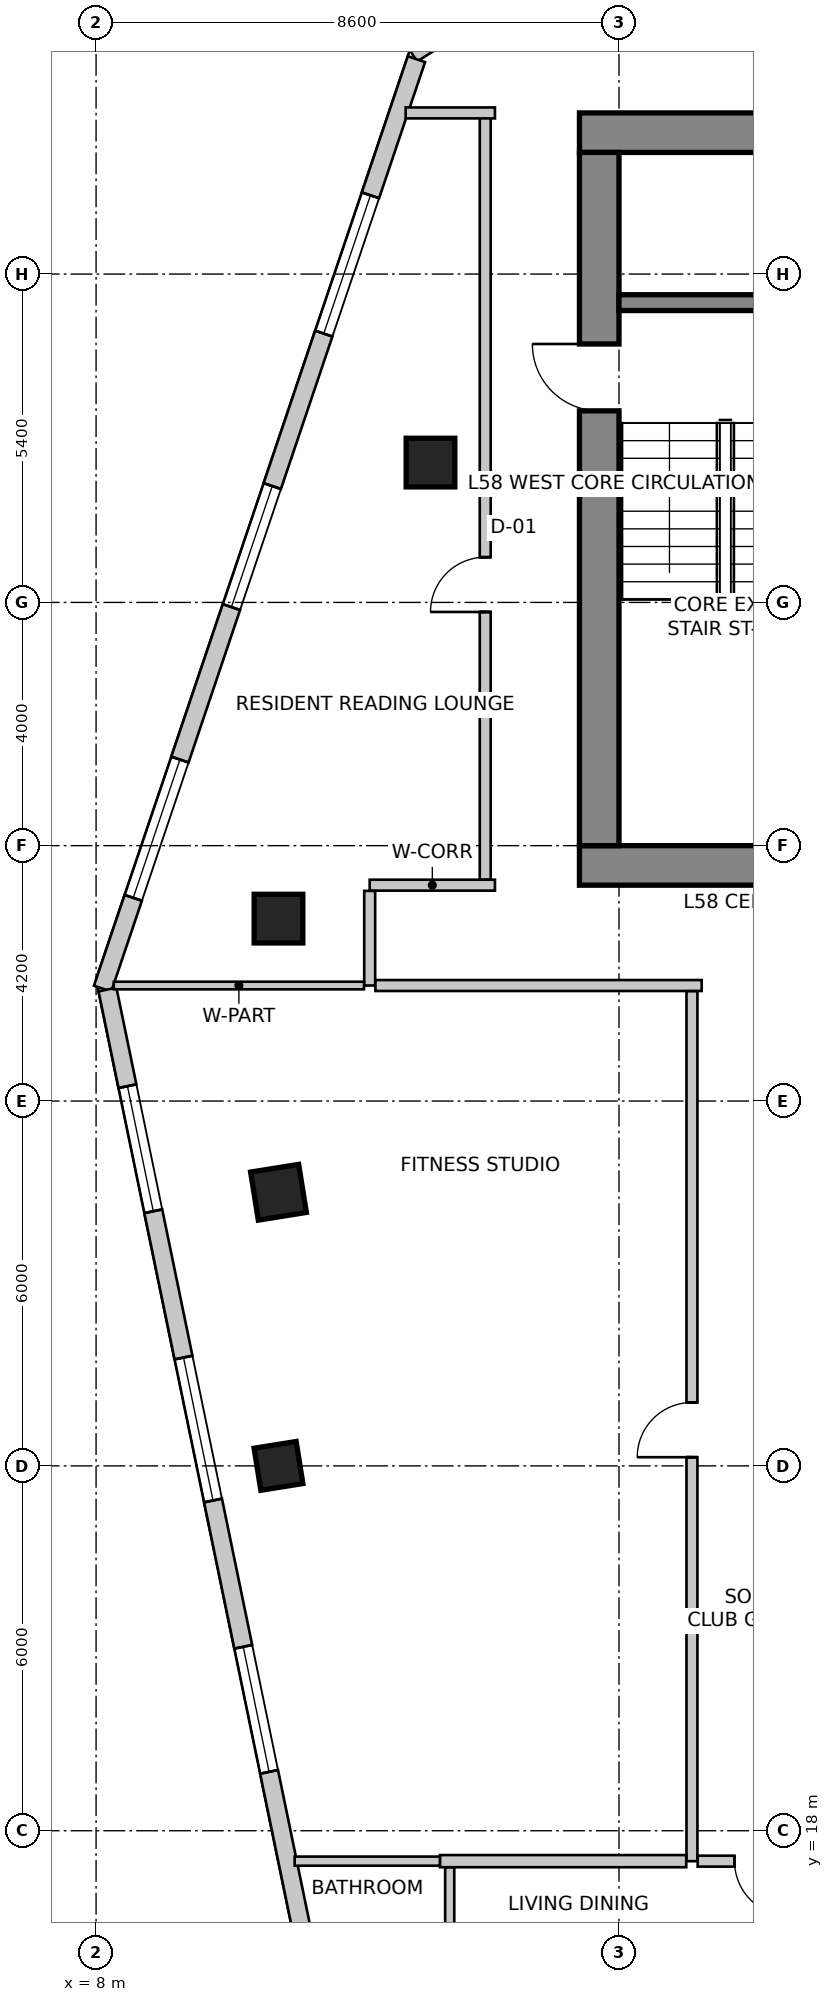
"""IFC4 building model, lengths in metres.
Left out: names, types, materials, properties, quantities, classifications, styles, units other than length and angle.
Written with IfcOpenShell. Run it as: python <this file> out.ifc"""

import sys

from ifc_helpers import new_model, si_unit, direction, frame, frame_2d, origin, origin_2d, place, context, subcontext, project, spatial, rectangle, extrude, source, transform, mapped, element, fill, save


model = new_model("IFC4")
c1 = context("Model", 3, precision=1e-05, world=origin(), true_north=direction((0.0, 1.0)))
c2 = subcontext(c1, "Body", "Model", "MODEL_VIEW")
j1 = project(units=[si_unit("LENGTHUNIT", "METRE"), si_unit("PLANEANGLEUNIT", "RADIAN")], contexts=[c1])
p1 = place(None, origin())
s1 = spatial("IfcSite", under=j1, at=p1, CompositionType="ELEMENT")
p2 = place(p1, origin())
s2 = spatial("IfcBuilding", under=s1, at=p2, CompositionType="ELEMENT")
p3 = place(p2, frame((0.0, 0.0, 228.9)))
s3 = spatial("IfcBuildingStorey", under=s2, at=p3, CompositionType="ELEMENT", Elevation=228.9)
p4 = place(p3, frame((15.95, 45.925, 0.0), z_axis=(0.0, 0.0, 1.0), x_axis=(1.0, 0.0, 0.0)))
e1 = element("IfcWall", 1, at=p4, inside=s3, PredefinedType="SHEAR", context=c2, shape_type="SweptSolid", body=[
    extrude(rectangle(XDim=15.7, YDim=0.65, at=frame_2d((7.85, 0.0))), origin(), (0.0, 0.0, 1.0), 3.5),
])
p5 = place(p3, frame((15.95, 33.875, 0.0), z_axis=(0.0, 0.0, 1.0), x_axis=(1.0, 0.0, 0.0)))
e2 = element("IfcWall", 2, at=p5, inside=s3, PredefinedType="SHEAR", context=c2, shape_type="SweptSolid", body=[
    extrude(rectangle(XDim=15.7, YDim=0.65, at=frame_2d((7.85, 0.0))), origin(), (0.0, 0.0, 1.0), 3.5),
])
m1 = source(origin(), c2, "Body", "SweptSolid", [
    extrude(rectangle(XDim=1.1, YDim=2.15, at=frame_2d((0.55, 1.075))), frame((0.0, 0.335, 0.0), z_axis=(0.0, -1.0, 0.0), x_axis=(1.0, 0.0, 0.0)), (0.0, 0.0, 1.0), 0.67),
])
p6 = place(p5, frame((10.08, 0.0, 0.0)))
e3 = element("IfcOpeningElement", 3, at=p6, cuts=e2, PredefinedType="OPENING", context=c2, shape_type="MappedRepresentation", body=[
    mapped(m1, transform((0.0, 0.0, 0.0), scale=1.0)),
])
p7 = place(p3, frame((16.275, 34.2, 0.0), z_axis=(0.0, 0.0, 1.0), x_axis=(0.0, 1.0, 0.0)))
e4 = element("IfcWall", 4, at=p7, inside=s3, PredefinedType="SHEAR", context=c2, shape_type="SweptSolid", body=[
    extrude(rectangle(XDim=11.4, YDim=0.65, at=frame_2d((5.7, 0.0))), origin(), (0.0, 0.0, 1.0), 3.5),
])
p8 = place(p7, frame((7.15, 0.0, 0.0)))
e5 = element("IfcOpeningElement", 5, at=p8, cuts=e4, PredefinedType="OPENING", context=c2, shape_type="MappedRepresentation", body=[
    mapped(m1, transform((0.0, 0.0, 0.0), scale=1.0)),
])
p9 = place(p3, frame((16.6, 43.13, 0.0), z_axis=(0.0, 0.0, 1.0), x_axis=(1.0, 0.0, 0.0)))
e6 = element("IfcWall", 6, at=p9, inside=s3, PredefinedType="SHEAR", context=c2, shape_type="SweptSolid", body=[
    extrude(rectangle(XDim=3.5, YDim=0.26, at=frame_2d((1.75, 0.0))), origin(), (0.0, 0.0, 1.0), 3.5),
])
m2 = source(origin(), c2, "Body", "SweptSolid", [
    extrude(rectangle(XDim=0.8, YDim=0.8, at=origin_2d()), origin(), (0.0, 0.0, 1.0), 3.5),
])
for number, where, z_axis, x_axis in (
    (7, (11.0, 33.0, 0.0), (0.0, 0.0, 1.0), (1.0, 0.0, 0.0)),
    (8, (13.5, 40.5, 0.0), (0.0, 0.0, 1.0), (1.0, 0.0, 0.0)),
    (9, (11.0, 28.5, 0.0), (0.0, 0.0, 1.0), (0.158, -0.987, 0.0)),
):
    element("IfcColumn", number, at=place(p3, frame(where, z_axis=z_axis, x_axis=x_axis)), inside=s3, PredefinedType="COLUMN", context=c2, shape_type="MappedRepresentation", body=[
        mapped(m2, transform((0.0, 0.0, 0.0), scale=1.0)),
    ])
m3 = source(origin(), c2, "Body", "SweptSolid", [
    extrude(rectangle(XDim=0.7, YDim=0.7, at=origin_2d()), origin(), (0.0, 0.0, 1.0), 3.5),
])
p10 = place(p3, frame((11.0, 24.0, 0.0), z_axis=(0.0, 0.0, 1.0), x_axis=(0.158158067254, -0.987413806751, 0.0)))
e10 = element("IfcColumn", 10, at=p10, inside=s3, PredefinedType="COLUMN", context=c2, shape_type="MappedRepresentation", body=[
    mapped(m3, transform((0.0, 0.0, 0.0), scale=1.0)),
])
p11 = place(p3, frame((21.874, 52.742, 0.0), z_axis=(0.0, 0.0, 1.0), x_axis=(-0.84365659959, -0.536883173482, 0.0)))
e11 = element("IfcWall", 11, at=p11, inside=s3, PredefinedType="SOLIDWALL", context=c2, shape_type="SweptSolid", body=[
    extrude(rectangle(XDim=10.283, YDim=0.3, at=frame_2d((5.142, 0.0))), origin(), (0.0, 0.0, 1.0), 3.25),
])
m4 = source(origin(), c2, "Body", "SweptSolid", [
    extrude(rectangle(XDim=2.1, YDim=2.0, at=frame_2d((1.05, 1.0))), frame((0.0, 0.16, 0.0), z_axis=(0.0, -1.0, 0.0), x_axis=(1.0, 0.0, 0.0)), (0.0, 0.0, 1.0), 0.32),
])
p12 = place(p11, frame((3.457, 0.0, 0.85)))
e12 = element("IfcOpeningElement", 12, at=p12, cuts=e11, PredefinedType="OPENING", context=c2, shape_type="MappedRepresentation", body=[
    mapped(m4, transform((0.0, 0.0, 0.0), scale=1.0)),
])
p13 = place(p3, frame((13.269, 47.134, 0.0), z_axis=(0.0, 0.0, 1.0), x_axis=(-0.319920776449, -0.947444297464, 0.0)))
e13 = element("IfcWall", 13, at=p13, inside=s3, PredefinedType="SOLIDWALL", context=c2, shape_type="SweptSolid", body=[
    extrude(rectangle(XDim=16.133, YDim=0.3, at=frame_2d((8.067, 0.0))), origin(), (0.0, 0.0, 1.0), 3.25),
])
m5 = source(origin(), c2, "Body", "SweptSolid", [
    extrude(rectangle(XDim=2.4, YDim=2.2, at=frame_2d((1.2, 1.1))), frame((0.0, 0.16, 0.0), z_axis=(0.0, -1.0, 0.0), x_axis=(1.0, 0.0, 0.0)), (0.0, 0.0, 1.0), 0.32),
])
p14 = place(p13, frame((2.363, 0.0, 0.85)))
e14 = element("IfcOpeningElement", 14, at=p14, cuts=e13, PredefinedType="OPENING", context=c2, shape_type="MappedRepresentation", body=[
    mapped(m5, transform((0.0, 0.0, 0.0), scale=1.0)),
])
p15 = place(p13, frame((7.41, 0.0, 0.85)))
e15 = element("IfcOpeningElement", 15, at=p15, cuts=e13, PredefinedType="OPENING", context=c2, shape_type="MappedRepresentation", body=[
    mapped(m4, transform((0.0, 0.0, 0.0), scale=1.0)),
])
p16 = place(p13, frame((12.157, 0.0, 0.85)))
e16 = element("IfcOpeningElement", 16, at=p16, cuts=e13, PredefinedType="OPENING", context=c2, shape_type="MappedRepresentation", body=[
    mapped(m5, transform((0.0, 0.0, 0.0), scale=1.0)),
])
p17 = place(p3, frame((8.188, 31.834, 0.0), z_axis=(0.0, 0.0, 1.0), x_axis=(0.202303475707, -0.979322880217, 0.0)))
e17 = element("IfcWall", 17, at=p17, inside=s3, PredefinedType="SOLIDWALL", context=c2, shape_type="SweptSolid", body=[
    extrude(rectangle(XDim=15.766, YDim=0.3, at=frame_2d((7.883, 0.0))), origin(), (0.0, 0.0, 1.0), 3.25),
])
p18 = place(p17, frame((1.623, 0.0, 0.85)))
e18 = element("IfcOpeningElement", 18, at=p18, cuts=e17, PredefinedType="OPENING", context=c2, shape_type="MappedRepresentation", body=[
    mapped(m4, transform((0.0, 0.0, 0.0), scale=1.0)),
])
p19 = place(p17, frame((6.18, 0.0, 0.85)))
e19 = element("IfcOpeningElement", 19, at=p19, cuts=e17, PredefinedType="OPENING", context=c2, shape_type="MappedRepresentation", body=[
    mapped(m5, transform((0.0, 0.0, 0.0), scale=1.0)),
])
p20 = place(p17, frame((11.037, 0.0, 0.85)))
e20 = element("IfcOpeningElement", 20, at=p20, cuts=e17, PredefinedType="OPENING", context=c2, shape_type="MappedRepresentation", body=[
    mapped(m4, transform((0.0, 0.0, 0.0), scale=1.0)),
])
p21 = place(p3, frame((12.5, 33.55, 0.0), z_axis=(0.0, 0.0, 1.0), x_axis=(1.0, 0.0, 0.0)))
e21 = element("IfcWall", 21, at=p21, inside=s3, PredefinedType="PARTITIONING", context=c2, shape_type="SweptSolid", body=[
    extrude(rectangle(XDim=2.06, YDim=0.18, at=frame_2d((1.03, 0.0))), origin(), (0.0, 0.0, 1.0), 3.25),
])
p22 = place(p3, frame((12.5, 31.9, 0.0), z_axis=(0.0, 0.0, 1.0), x_axis=(0.0, 1.0, 0.0)))
e22 = element("IfcWall", 22, at=p22, inside=s3, PredefinedType="PARTITIONING", context=c2, shape_type="SweptSolid", body=[
    extrude(rectangle(XDim=1.556, YDim=0.18, at=frame_2d((0.778, 0.0))), origin(), (0.0, 0.0, 1.0), 2.919),
])
p23 = place(p3, frame((17.96, 31.9, 0.0), z_axis=(0.0, 0.0, 1.0), x_axis=(-1.0, 0.0, 0.0)))
e23 = element("IfcWall", 23, at=p23, inside=s3, PredefinedType="PARTITIONING", context=c2, shape_type="SweptSolid", body=[
    extrude(rectangle(XDim=5.366, YDim=0.18, at=frame_2d((2.683, 0.0))), origin(), (0.0, 0.0, 1.0), 2.919),
])
p24 = place(p3, frame((14.4, 33.644, 0.0), z_axis=(0.0, 0.0, 1.0), x_axis=(0.0, 1.0, 0.0)))
e24 = element("IfcWall", 24, at=p24, inside=s3, PredefinedType="PARTITIONING", context=c2, shape_type="SweptSolid", body=[
    extrude(rectangle(XDim=12.606, YDim=0.18, at=frame_2d((6.303, 0.0))), origin(), (0.0, 0.0, 1.0), 3.25),
])
m6 = source(origin(), c2, "Body", "SweptSolid", [
    extrude(rectangle(XDim=0.9, YDim=2.15, at=frame_2d((0.45, 1.075))), frame((0.0, 0.1, 0.0), z_axis=(0.0, -1.0, 0.0), x_axis=(1.0, 0.0, 0.0)), (0.0, 0.0, 1.0), 0.2),
])
p25 = place(p24, frame((4.399, 0.0, 0.0)))
e25 = element("IfcOpeningElement", 25, at=p25, cuts=e24, PredefinedType="OPENING", context=c2, shape_type="MappedRepresentation", body=[
    mapped(m6, transform((0.0, 0.0, 0.0), scale=1.0)),
])
p26 = place(p3, frame((14.56, 46.25, 0.0), z_axis=(0.0, 0.0, 1.0), x_axis=(-1.0, 0.0, 0.0)))
e26 = element("IfcWall", 26, at=p26, inside=s3, PredefinedType="PARTITIONING", context=c2, shape_type="SweptSolid", body=[
    extrude(rectangle(XDim=1.469, YDim=0.18, at=frame_2d((0.734, 0.0))), origin(), (0.0, 0.0, 1.0), 3.25),
])
p27 = place(p3, frame((12.406, 31.9, 0.0), z_axis=(0.0, 0.0, 1.0), x_axis=(-1.0, 0.0, 0.0)))
e27 = element("IfcWall", 27, at=p27, inside=s3, PredefinedType="PARTITIONING", context=c2, shape_type="SweptSolid", body=[
    extrude(rectangle(XDim=4.115, YDim=0.125, at=frame_2d((2.057, 0.0))), origin(), (0.0, 0.0, 1.0), 2.542),
])
p28 = place(p3, frame((17.8, 17.5, 0.0), z_axis=(0.0, 0.0, 1.0), x_axis=(0.0, 1.0, 0.0)))
e28 = element("IfcWall", 28, at=p28, inside=s3, PredefinedType="PARTITIONING", context=c2, shape_type="SweptSolid", body=[
    extrude(rectangle(XDim=14.306, YDim=0.18, at=frame_2d((7.153, 0.0))), origin(), (0.0, 0.0, 1.0), 2.766),
])
p29 = place(p28, frame((6.643, 0.0, 0.0)))
e29 = element("IfcOpeningElement", 29, at=p29, cuts=e28, PredefinedType="OPENING", context=c2, shape_type="MappedRepresentation", body=[
    mapped(m6, transform((0.0, 0.0, 0.0), scale=1.0)),
])
p30 = place(p3, frame((20.006, 17.5, 0.0), z_axis=(0.0, 0.0, 1.0), x_axis=(-1.0, 0.0, 0.0)))
e30 = element("IfcWall", 30, at=p30, inside=s3, PredefinedType="PARTITIONING", context=c2, shape_type="SweptSolid", body=[
    extrude(rectangle(XDim=2.112, YDim=0.18, at=frame_2d((1.056, 0.0))), origin(), (0.0, 0.0, 1.0), 3.25),
])
p31 = place(p30, frame((0.606, 0.0, 0.0)))
e31 = element("IfcOpeningElement", 31, at=p31, cuts=e30, PredefinedType="OPENING", context=c2, shape_type="MappedRepresentation", body=[
    mapped(m6, transform((0.0, 0.0, 0.0), scale=1.0)),
])
p32 = place(p3, frame((17.706, 17.5, 0.0), z_axis=(0.0, 0.0, 1.0), x_axis=(-1.0, 0.0, 0.0)))
e32 = element("IfcWall", 32, at=p32, inside=s3, PredefinedType="PARTITIONING", context=c2, shape_type="SweptSolid", body=[
    extrude(rectangle(XDim=4.05, YDim=0.2, at=frame_2d((2.025, 0.0))), origin(), (0.0, 0.0, 1.0), 3.25),
])
p33 = place(p3, frame((13.654, 17.5, 0.0), z_axis=(0.0, 0.0, 1.0), x_axis=(-1.0, 0.0, 0.0)))
e33 = element("IfcWall", 33, at=p33, inside=s3, PredefinedType="PARTITIONING", context=c2, shape_type="SweptSolid", body=[
    extrude(rectangle(XDim=2.388, YDim=0.15, at=frame_2d((1.194, 0.0))), origin(), (0.0, 0.0, 1.0), 3.25),
])
p34 = place(p3, frame((13.816, 12.865, 0.0), z_axis=(0.0, 0.0, 1.0), x_axis=(0.0, 1.0, 0.0)))
e34 = element("IfcWall", 34, at=p34, inside=s3, PredefinedType="PARTITIONING", context=c2, shape_type="SweptSolid", body=[
    extrude(rectangle(XDim=4.531, YDim=0.15, at=frame_2d((2.266, 0.0))), origin(), (0.0, 0.0, 1.0), 3.25),
])
m7 = source(origin(), c2, "Body", "SweptSolid", [
    extrude(rectangle(XDim=0.85, YDim=2.15, at=frame_2d((0.425, 1.075))), frame((0.0, 0.085, 0.0), z_axis=(0.0, -1.0, 0.0), x_axis=(1.0, 0.0, 0.0)), (0.0, 0.0, 1.0), 0.17),
])
p35 = place(p34, frame((1.841, 0.0, 0.0)))
e35 = element("IfcOpeningElement", 35, at=p35, cuts=e34, PredefinedType="OPENING", context=c2, shape_type="MappedRepresentation", body=[
    mapped(m7, transform((0.0, 0.0, 0.0), scale=1.0)),
])
m8 = source(origin(), c2, "Body", "SweptSolid", [
    extrude(rectangle(XDim=2.4, YDim=2.2, at=frame_2d((1.2, 1.1))), frame((0.0, -0.015, 0.0), z_axis=(0.0, -1.0, 0.0), x_axis=(1.0, 0.0, 0.0)), (0.0, 0.0, 1.0), 0.06),
])
p36 = place(p14, origin())
e36 = element("IfcWindow", 36, at=p36, inside=s3, PartitioningType="SINGLE_PANEL", PredefinedType="WINDOW", context=c2, shape_type="MappedRepresentation", body=[
    mapped(m8, transform((0.0, 0.0, 0.0), scale=1.0)),
])
fill(e14, e36)
m9 = source(origin(), c2, "Body", "SweptSolid", [
    extrude(rectangle(XDim=2.1, YDim=2.0, at=frame_2d((1.05, 1.0))), frame((0.0, -0.015, 0.0), z_axis=(0.0, -1.0, 0.0), x_axis=(1.0, 0.0, 0.0)), (0.0, 0.0, 1.0), 0.06),
])
p37 = place(p15, origin())
e37 = element("IfcWindow", 37, at=p37, inside=s3, PartitioningType="SINGLE_PANEL", PredefinedType="WINDOW", context=c2, shape_type="MappedRepresentation", body=[
    mapped(m9, transform((0.0, 0.0, 0.0), scale=1.0)),
])
fill(e15, e37)
p38 = place(p16, origin())
e38 = element("IfcWindow", 38, at=p38, inside=s3, PartitioningType="SINGLE_PANEL", PredefinedType="WINDOW", context=c2, shape_type="MappedRepresentation", body=[
    mapped(m8, transform((0.0, 0.0, 0.0), scale=1.0)),
])
fill(e16, e38)
p39 = place(p18, origin())
e39 = element("IfcWindow", 39, at=p39, inside=s3, PartitioningType="SINGLE_PANEL", PredefinedType="WINDOW", context=c2, shape_type="MappedRepresentation", body=[
    mapped(m9, transform((0.0, 0.0, 0.0), scale=1.0)),
])
fill(e18, e39)
p40 = place(p19, origin())
e40 = element("IfcWindow", 40, at=p40, inside=s3, PartitioningType="SINGLE_PANEL", PredefinedType="WINDOW", context=c2, shape_type="MappedRepresentation", body=[
    mapped(m8, transform((0.0, 0.0, 0.0), scale=1.0)),
])
fill(e19, e40)
p41 = place(p20, origin())
e41 = element("IfcWindow", 41, at=p41, inside=s3, PartitioningType="SINGLE_PANEL", PredefinedType="WINDOW", context=c2, shape_type="MappedRepresentation", body=[
    mapped(m9, transform((0.0, 0.0, 0.0), scale=1.0)),
])
fill(e20, e41)
m10 = source(origin(), c2, "Body", "SweptSolid", [
    extrude(rectangle(XDim=1.1, YDim=2.15, at=frame_2d((0.55, 1.075))), frame((0.0, 0.025, 0.0), z_axis=(0.0, -1.0, 0.0), x_axis=(1.0, 0.0, 0.0)), (0.0, 0.0, 1.0), 0.05),
])
p42 = place(p8, origin())
e42 = element("IfcDoor", 42, at=p42, inside=s3, OperationType="SINGLE_SWING_RIGHT", PredefinedType="DOOR", context=c2, shape_type="MappedRepresentation", body=[
    mapped(m10, transform((0.0, 0.0, 0.0), scale=1.0)),
])
fill(e5, e42)
m11 = source(origin(), c2, "Body", "SweptSolid", [
    extrude(rectangle(XDim=0.9, YDim=2.15, at=frame_2d((0.45, 1.075))), frame((0.0, 0.025, 0.0), z_axis=(0.0, -1.0, 0.0), x_axis=(1.0, 0.0, 0.0)), (0.0, 0.0, 1.0), 0.05),
])
p43 = place(p25, origin())
e43 = element("IfcDoor", 43, at=p43, inside=s3, OperationType="SINGLE_SWING_LEFT", PredefinedType="DOOR", context=c2, shape_type="MappedRepresentation", body=[
    mapped(m11, transform((0.0, 0.0, 0.0), scale=1.0)),
])
fill(e25, e43)
p44 = place(p29, origin())
e44 = element("IfcDoor", 44, at=p44, inside=s3, OperationType="SINGLE_SWING_LEFT", PredefinedType="DOOR", context=c2, shape_type="MappedRepresentation", body=[
    mapped(m11, transform((0.0, 0.0, 0.0), scale=1.0)),
])
fill(e29, e44)
m12 = source(origin(), c2, "Body", "SweptSolid", [
    extrude(rectangle(XDim=0.9, YDim=2.15, at=frame_2d((0.45, 1.075))), frame((0.0, 0.025, 0.0), z_axis=(0.0, -1.0, 0.0), x_axis=(1.0, 0.0, 0.0)), (0.0, 0.0, 1.0), 0.05),
])
p45 = place(p31, origin())
e45 = element("IfcDoor", 45, at=p45, inside=s3, OperationType="SINGLE_SWING_LEFT", PredefinedType="DOOR", context=c2, shape_type="MappedRepresentation", body=[
    mapped(m12, transform((0.0, 0.0, 0.0), scale=1.0)),
])
fill(e31, e45)
save(model, sys.argv[1])
